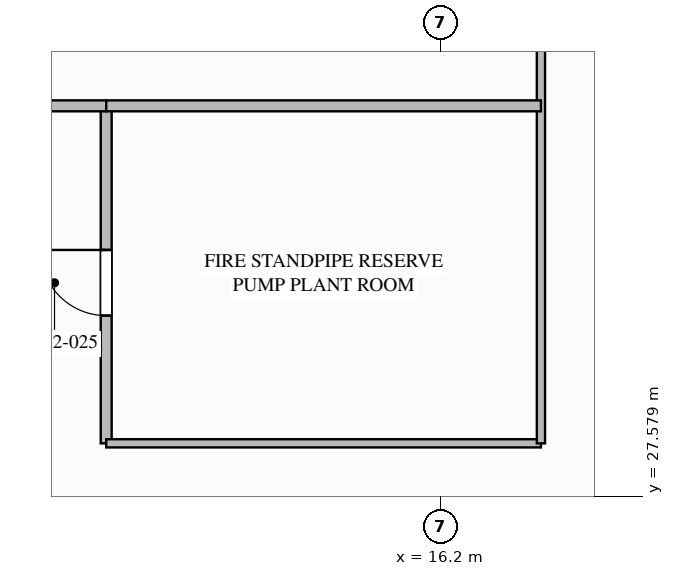
"""IFC4 building model, lengths in metres.
Left out: names, types, materials, properties, quantities, classifications, styles, units other than length and angle.
Written with IfcOpenShell. Run it as: python <this file> out.ifc"""

import sys

from ifc_helpers import new_model, si_unit, direction, frame, frame_2d, origin, place, context, subcontext, project, spatial, rectangle, extrude, element, fill, save


model = new_model("IFC4")
c1 = context("Model", 3, precision=1e-05, world=origin(), true_north=direction((0.0, 1.0)))
c2 = subcontext(c1, "Body", "Model", "MODEL_VIEW")
j1 = project(units=[si_unit("LENGTHUNIT", "METRE"), si_unit("PLANEANGLEUNIT", "RADIAN")], contexts=[c1])
p1 = place(None, origin())
s1 = spatial("IfcSite", under=j1, at=p1, CompositionType="ELEMENT")
p2 = place(p1, origin())
s2 = spatial("IfcBuilding", under=s1, at=p2, CompositionType="ELEMENT")
p3 = place(p2, frame((0.0, 0.0, 200.1)))
s3 = spatial("IfcBuildingStorey", under=s2, at=p3, CompositionType="ELEMENT", Elevation=200.1)
p4 = place(p3, frame((10.7, 28.45, 0.0), z_axis=(0.0, 0.0, 1.0), x_axis=(0.0, 1.0, 0.0)))
e1 = element("IfcWall", 1, at=p4, inside=s3, PredefinedType="SOLIDWALL", context=c2, shape_type="SweptSolid", body=[
    extrude(rectangle(XDim=5.55, YDim=0.18, at=frame_2d((2.775, 0.0))), origin(), (0.0, 0.0, 1.0), 4.74),
])
p5 = place(p4, frame((2.1, 0.0, 0.0)))
e2 = element("IfcOpeningElement", 2, at=p5, cuts=e1, PredefinedType="OPENING", context=c2, shape_type="SweptSolid", body=[
    extrude(rectangle(XDim=1.08, YDim=2.04, at=frame_2d((0.54, 1.02))), frame((0.0, 0.1, 0.0), z_axis=(0.0, -1.0, 0.0), x_axis=(1.0, 0.0, 0.0)), (0.0, 0.0, 1.0), 0.2),
])
p6 = place(p3, frame((8.6, 34.0, 0.0), z_axis=(0.0, 0.0, 1.0), x_axis=(1.0, 0.0, 0.0)))
e3 = element("IfcWall", 3, at=p6, inside=s3, PredefinedType="SOLIDWALL", context=c2, shape_type="SweptSolid", body=[
    extrude(rectangle(XDim=2.1, YDim=0.18, at=frame_2d((1.05, 0.0))), origin(), (0.0, 0.0, 1.0), 4.74),
])
p7 = place(p3, frame((10.7, 28.45, 0.0), z_axis=(0.0, 0.0, 1.0), x_axis=(1.0, 0.0, 0.0)))
e4 = element("IfcWall", 4, at=p7, inside=s3, PredefinedType="PARTITIONING", context=c2, shape_type="SweptSolid", body=[
    extrude(rectangle(XDim=7.15, YDim=0.135, at=frame_2d((3.575, 0.0))), origin(), (0.0, 0.0, 1.0), 4.74),
])
p8 = place(p3, frame((17.85, 28.45, 0.0), z_axis=(0.0, 0.0, 1.0), x_axis=(0.0, 1.0, 0.0)))
e5 = element("IfcWall", 5, at=p8, inside=s3, PredefinedType="PARTITIONING", context=c2, shape_type="SweptSolid", body=[
    extrude(rectangle(XDim=16.55, YDim=0.135, at=frame_2d((8.275, 0.0))), origin(), (0.0, 0.0, 1.0), 4.74),
])
p9 = place(p3, frame((10.7, 34.0, 0.0), z_axis=(0.0, 0.0, 1.0), x_axis=(1.0, 0.0, 0.0)))
e6 = element("IfcWall", 6, at=p9, inside=s3, PredefinedType="SOLIDWALL", context=c2, shape_type="SweptSolid", body=[
    extrude(rectangle(XDim=7.15, YDim=0.18, at=frame_2d((3.575, 0.0))), origin(), (0.0, 0.0, 1.0), 4.74),
])
p10 = place(p5, origin())
e7 = element("IfcDoor", 7, at=p10, inside=s3, OperationType="SINGLE_SWING_RIGHT", PredefinedType="DOOR", context=c2, shape_type="SweptSolid", body=[
    extrude(rectangle(XDim=1.08, YDim=2.04, at=frame_2d((0.54, 1.02))), frame((0.0, 0.025, 0.0), z_axis=(0.0, -1.0, 0.0), x_axis=(1.0, 0.0, 0.0)), (0.0, 0.0, 1.0), 0.05),
])
fill(e2, e7)
save(model, sys.argv[1])
